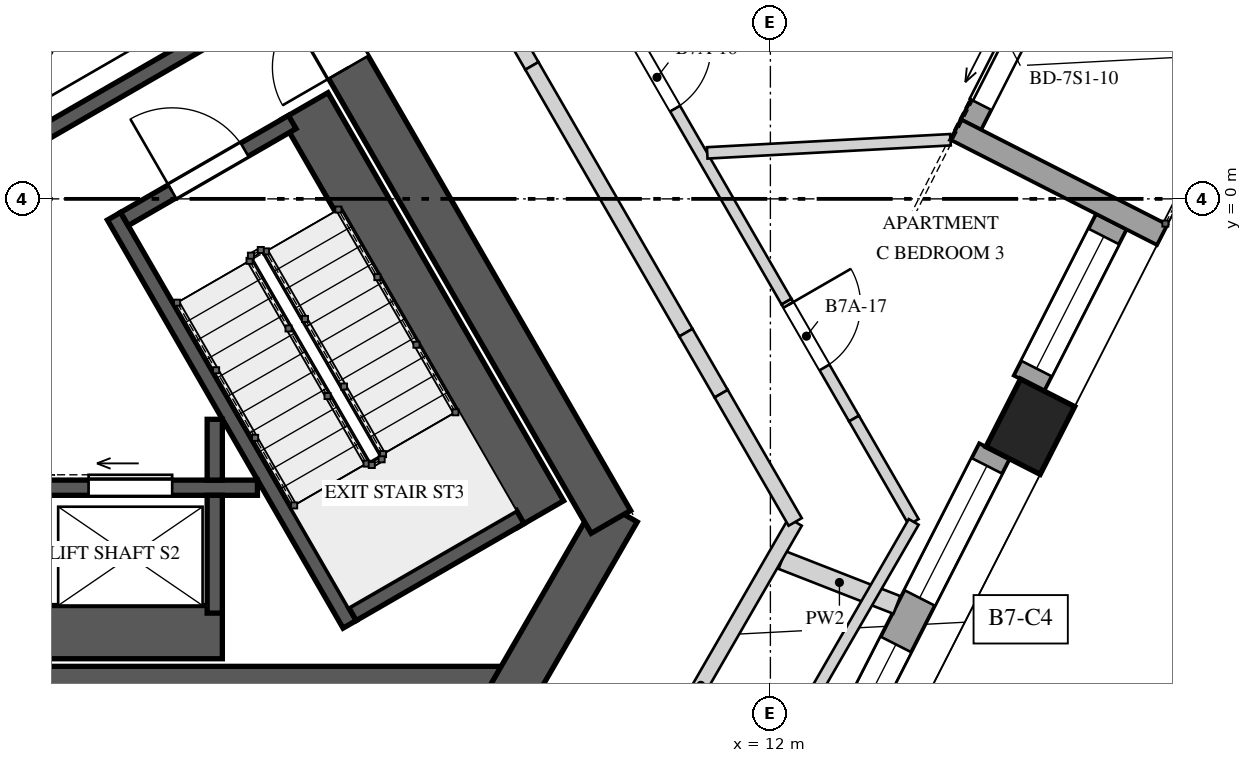
"""IFC4 building model, lengths in metres.
Left out: names, types, materials, properties, quantities, classifications, styles, units other than length and angle.
Written with IfcOpenShell. Run it as: python <this file> out.ifc"""

import sys

from ifc_helpers import new_model, si_unit, direction, frame, frame_2d, origin, origin_2d, place, context, subcontext, project, spatial, polyline, rectangle, outline, extrude, element, fill, save


model = new_model("IFC4")
c1 = context("Model", 3, precision=1e-05, world=origin(), true_north=direction((0.0, 1.0)))
c2 = subcontext(c1, "Body", "Model", "MODEL_VIEW")
j1 = project(units=[si_unit("LENGTHUNIT", "METRE"), si_unit("PLANEANGLEUNIT", "RADIAN")], contexts=[c1])
p1 = place(None, origin())
s1 = spatial("IfcSite", under=j1, at=p1, CompositionType="ELEMENT")
p2 = place(p1, origin())
s2 = spatial("IfcBuilding", under=s1, at=p2, CompositionType="ELEMENT")
p3 = place(p2, frame((0.0, 0.0, 274.4)))
s3 = spatial("IfcBuildingStorey", under=s2, at=p3, CompositionType="ELEMENT", Elevation=274.4)
p4 = place(p3, frame((-8.631, -6.45, 0.0), z_axis=(0.0, 0.0, 1.0), x_axis=(1.0, 0.0, 0.0)))
e1 = element("IfcWall", 1, at=p4, inside=s3, PredefinedType="SHEAR", context=c2, shape_type="SweptSolid", body=[
    extrude(rectangle(XDim=17.263, YDim=0.6, at=frame_2d((8.631, 0.0))), origin(), (0.0, 0.0, 1.0), 4.0),
])
p5 = place(p4, frame((6.836, 0.0, 0.0)))
e2 = element("IfcOpeningElement", 2, at=p5, cuts=e1, PredefinedType="OPENING", context=c2, shape_type="SweptSolid", body=[
    extrude(rectangle(XDim=1.0, YDim=2.4, at=frame_2d((0.5, 1.2))), frame((0.0, 0.31, 0.0), z_axis=(0.0, -1.0, 0.0), x_axis=(1.0, 0.0, 0.0)), (0.0, 0.0, 1.0), 0.62),
])
p6 = place(p3, frame((8.545, -6.6, 0.0), z_axis=(0.0, 0.0, 1.0), x_axis=(0.499995765644, 0.866027848477, 0.0)))
e3 = element("IfcWall", 3, at=p6, inside=s3, PredefinedType="SHEAR", context=c2, shape_type="SweptSolid", body=[
    extrude(rectangle(XDim=2.887, YDim=0.6, at=frame_2d((1.443, 0.0))), origin(), (0.0, 0.0, 1.0), 4.0),
])
p7 = place(p3, frame((9.902, -4.25, 0.0), z_axis=(0.0, 0.0, 1.0), x_axis=(-0.499999536116, 0.866025671608, 0.0)))
e4 = element("IfcWall", 4, at=p7, inside=s3, PredefinedType="SHEAR", context=c2, shape_type="SweptSolid", body=[
    extrude(rectangle(XDim=17.263, YDim=0.6, at=frame_2d((8.631, 0.0))), origin(), (0.0, 0.0, 1.0), 4.0),
])
p8 = place(p7, frame((6.906, 0.0, 0.0)))
e5 = element("IfcOpeningElement", 5, at=p8, cuts=e4, PredefinedType="OPENING", context=c2, shape_type="SweptSolid", body=[
    extrude(rectangle(XDim=1.0, YDim=2.4, at=frame_2d((0.5, 1.2))), frame((0.0, 0.31, 0.0), z_axis=(0.0, -1.0, 0.0), x_axis=(1.0, 0.0, 0.0)), (0.0, 0.0, 1.0), 0.62),
])
p9 = place(p3, frame((15.42, -2.997, -0.35), z_axis=(0.0, 0.0, 1.0), x_axis=(0.45399049974, 0.891006524188, 0.0)))
e6 = element("IfcColumn", 6, at=p9, inside=s3, PredefinedType="COLUMN", context=c2, shape_type="SweptSolid", body=[
    extrude(rectangle(XDim=1.0, YDim=0.8, at=origin_2d()), origin(), (0.0, 0.0, 1.0), 4.35),
])
p10 = place(p3, frame((11.47, -10.143, 0.0), z_axis=(0.0, 0.0, 1.0), x_axis=(0.453995484395, 0.891003984362, 0.0)))
e7 = element("IfcWall", 7, at=p10, inside=s3, PredefinedType="SOLIDWALL", context=c2, shape_type="SweptSolid", body=[
    extrude(rectangle(XDim=7.66, YDim=0.45, at=frame_2d((3.83, 0.0))), origin(), (0.0, 0.0, 1.0), 3.3),
])
p11 = place(p10, frame((0.218, 0.0, 0.4)))
e8 = element("IfcOpeningElement", 8, at=p11, cuts=e7, PredefinedType="OPENING", context=c2, shape_type="SweptSolid", body=[
    extrude(rectangle(XDim=1.95, YDim=2.75, at=frame_2d((0.975, 1.375))), frame((0.0, 0.235, 0.0), z_axis=(0.0, -1.0, 0.0), x_axis=(1.0, 0.0, 0.0)), (0.0, 0.0, 1.0), 0.47),
])
p12 = place(p10, frame((2.855, 0.0, 0.4)))
e9 = element("IfcOpeningElement", 9, at=p12, cuts=e7, PredefinedType="OPENING", context=c2, shape_type="SweptSolid", body=[
    extrude(rectangle(XDim=1.95, YDim=2.75, at=frame_2d((0.975, 1.375))), frame((0.0, 0.235, 0.0), z_axis=(0.0, -1.0, 0.0), x_axis=(1.0, 0.0, 0.0)), (0.0, 0.0, 1.0), 0.47),
])
p13 = place(p10, frame((5.492, 0.0, 0.4)))
e10 = element("IfcOpeningElement", 10, at=p13, cuts=e7, PredefinedType="OPENING", context=c2, shape_type="SweptSolid", body=[
    extrude(rectangle(XDim=1.95, YDim=2.75, at=frame_2d((0.975, 1.375))), frame((0.0, 0.235, 0.0), z_axis=(0.0, -1.0, 0.0), x_axis=(1.0, 0.0, 0.0)), (0.0, 0.0, 1.0), 0.47),
])
p14 = place(p3, frame((15.402, -2.427, 0.0), z_axis=(0.0, 0.0, 1.0), x_axis=(0.453951830128, 0.891026226283, 0.0)))
e11 = element("IfcWall", 11, at=p14, inside=s3, PredefinedType="SOLIDWALL", context=c2, shape_type="SweptSolid", body=[
    extrude(rectangle(XDim=2.387, YDim=0.45, at=frame_2d((1.193, 0.0))), origin(), (0.0, 0.0, 1.0), 3.3),
])
p15 = place(p14, frame((0.218, 0.0, 0.4)))
e12 = element("IfcOpeningElement", 12, at=p15, cuts=e11, PredefinedType="OPENING", context=c2, shape_type="SweptSolid", body=[
    extrude(rectangle(XDim=1.95, YDim=2.75, at=frame_2d((0.975, 1.375))), frame((0.0, 0.235, 0.0), z_axis=(0.0, -1.0, 0.0), x_axis=(1.0, 0.0, 0.0)), (0.0, 0.0, 1.0), 0.47),
])
p16 = place(p3, frame((14.639, 0.977, 0.0), z_axis=(0.0, 0.0, 1.0), x_axis=(0.45403292632, 0.890984905494, 0.0)))
e13 = element("IfcWall", 13, at=p16, inside=s3, PredefinedType="SOLIDWALL", context=c2, shape_type="SweptSolid", body=[
    extrude(rectangle(XDim=2.287, YDim=0.3, at=frame_2d((1.144, 0.0))), origin(), (0.0, 0.0, 1.0), 3.3),
])
p17 = place(p16, frame((0.293, 0.0, 0.0)))
e14 = element("IfcOpeningElement", 14, at=p17, cuts=e13, PredefinedType="OPENING", context=c2, shape_type="SweptSolid", body=[
    extrude(rectangle(XDim=1.7, YDim=2.5, at=frame_2d((0.85, 1.25))), frame((0.0, 0.16, 0.0), z_axis=(0.0, -1.0, 0.0), x_axis=(1.0, 0.0, 0.0)), (0.0, 0.0, 1.0), 0.32),
])
for number, where, z_axis, x_axis in (
    (15, (17.155, -0.473, 0.0), (0.0, 0.0, 1.0), (-0.891, 0.454, 0.0)),
    (16, (18.329, 1.832, 0.0), (0.0, 0.0, 1.0), (-0.891, 0.454, 0.0)),
):
    element("IfcWall", number, at=place(p3, frame(where, z_axis=z_axis, x_axis=x_axis)), inside=s3, PredefinedType="SOLIDWALL", context=c2, shape_type="SweptSolid", body=[
        extrude(rectangle(XDim=3.05, YDim=0.3, at=frame_2d((1.525, 0.0))), origin(), (0.0, 0.0, 1.0), 3.3),
    ])
p18 = place(p3, frame((8.976, -4.147, 0.0), z_axis=(0.0, 0.0, 1.0), x_axis=(-0.49998037582, 0.866036733513, 0.0)))
e17 = element("IfcWall", 17, at=p18, inside=s3, PredefinedType="SOLIDWALL", context=c2, shape_type="SweptSolid", body=[
    extrude(rectangle(XDim=6.2, YDim=0.7, at=frame_2d((3.1, 0.0))), origin(), (0.0, 0.0, 1.0), 3.65),
])
p19 = place(p3, frame((6.465, -5.597, 0.0), z_axis=(0.0, 0.0, 1.0), x_axis=(-0.49998037582, 0.866036733513, 0.0)))
e18 = element("IfcWall", 18, at=p19, inside=s3, PredefinedType="SOLIDWALL", context=c2, shape_type="SweptSolid", body=[
    extrude(rectangle(XDim=6.2, YDim=0.2, at=frame_2d((3.1, 0.0))), origin(), (0.0, 0.0, 1.0), 3.65),
])
p20 = place(p3, frame((6.501, -5.461, 0.0), z_axis=(0.0, 0.0, 1.0), x_axis=(0.865989465428, 0.500062241894, 0.0)))
e19 = element("IfcWall", 19, at=p20, inside=s3, PredefinedType="SOLIDWALL", context=c2, shape_type="SweptSolid", body=[
    extrude(rectangle(XDim=2.55, YDim=0.2, at=frame_2d((1.275, 0.0))), origin(), (0.0, 0.0, 1.0), 3.65),
])
p21 = place(p3, frame((3.501, -0.265, 0.0), z_axis=(0.0, 0.0, 1.0), x_axis=(0.866030925526, 0.499990435942, 0.0)))
e20 = element("IfcWall", 20, at=p21, inside=s3, PredefinedType="SOLIDWALL", context=c2, shape_type="SweptSolid", body=[
    extrude(rectangle(XDim=2.55, YDim=0.2, at=frame_2d((1.275, 0.0))), origin(), (0.0, 0.0, 1.0), 3.65),
])
p22 = place(p21, frame((0.725, 0.0, 0.0)))
e21 = element("IfcOpeningElement", 21, at=p22, cuts=e20, PredefinedType="OPENING", context=c2, shape_type="SweptSolid", body=[
    extrude(rectangle(XDim=1.1, YDim=2.4, at=frame_2d((0.55, 1.2))), frame((0.0, 0.11, 0.0), z_axis=(0.0, -1.0, 0.0), x_axis=(1.0, 0.0, 0.0)), (0.0, 0.0, 1.0), 0.22),
])
p23 = place(p3, frame((-0.71, -3.8, 0.0), z_axis=(0.0, 0.0, 1.0), x_axis=(1.0, 0.0, 0.0)))
e22 = element("IfcWall", 22, at=p23, inside=s3, PredefinedType="SOLIDWALL", context=c2, shape_type="SweptSolid", body=[
    extrude(rectangle(XDim=5.961, YDim=0.2, at=frame_2d((2.981, 0.0))), origin(), (0.0, 0.0, 1.0), 3.65),
])
p24 = place(p23, frame((1.09, 0.0, 0.0)))
e23 = element("IfcOpeningElement", 23, at=p24, cuts=e22, PredefinedType="OPENING", context=c2, shape_type="SweptSolid", body=[
    extrude(rectangle(XDim=1.1, YDim=2.1, at=frame_2d((0.55, 1.05))), frame((0.0, 0.11, 0.0), z_axis=(0.0, -1.0, 0.0), x_axis=(1.0, 0.0, 0.0)), (0.0, 0.0, 1.0), 0.22),
])
p25 = place(p23, frame((3.74, 0.0, 0.0)))
e24 = element("IfcOpeningElement", 24, at=p25, cuts=e22, PredefinedType="OPENING", context=c2, shape_type="SweptSolid", body=[
    extrude(rectangle(XDim=1.1, YDim=2.1, at=frame_2d((0.55, 1.05))), frame((0.0, 0.11, 0.0), z_axis=(0.0, -1.0, 0.0), x_axis=(1.0, 0.0, 0.0)), (0.0, 0.0, 1.0), 0.22),
])
p26 = place(p3, frame((-0.71, -5.7, 0.0), z_axis=(0.0, 0.0, 1.0), x_axis=(1.0, 0.0, 0.0)))
e25 = element("IfcWall", 25, at=p26, inside=s3, PredefinedType="SOLIDWALL", context=c2, shape_type="SweptSolid", body=[
    extrude(rectangle(XDim=5.5, YDim=0.7, at=frame_2d((2.75, 0.0))), origin(), (0.0, 0.0, 1.0), 3.65),
])
p27 = place(p3, frame((4.69, -3.9, 0.0), z_axis=(0.0, 0.0, 1.0), x_axis=(0.0, -1.0, 0.0)))
e26 = element("IfcWall", 26, at=p27, inside=s3, PredefinedType="SOLIDWALL", context=c2, shape_type="SweptSolid", body=[
    extrude(rectangle(XDim=1.55, YDim=0.2, at=frame_2d((0.775, 0.0))), origin(), (0.0, 0.0, 1.0), 3.65),
])
p28 = place(p3, frame((4.69, -2.9, 0.0), z_axis=(0.0, 0.0, 1.0), x_axis=(0.0, -1.0, 0.0)))
e27 = element("IfcWall", 27, at=p28, inside=s3, PredefinedType="SOLIDWALL", context=c2, shape_type="SweptSolid", body=[
    extrude(rectangle(XDim=0.8, YDim=0.2, at=frame_2d((0.4, 0.0))), origin(), (0.0, 0.0, 1.0), 3.65),
])
p29 = place(p3, frame((2.227, 0.743, 0.0), z_axis=(0.0, 0.0, 1.0), x_axis=(0.866035871367, 0.499981869177, 0.0)))
e28 = element("IfcWall", 28, at=p29, inside=s3, PredefinedType="SOLIDWALL", context=c2, shape_type="SweptSolid", body=[
    extrude(rectangle(XDim=3.15, YDim=0.2, at=frame_2d((1.575, 0.0))), origin(), (0.0, 0.0, 1.0), 3.65),
])
p30 = place(p3, frame((10.222, 2.094, 0.0), z_axis=(0.0, 0.0, 1.0), x_axis=(0.500039377857, -0.866002667774, 0.0)))
e29 = element("IfcWall", 29, at=p30, inside=s3, PredefinedType="PARTITIONING", context=c2, shape_type="SweptSolid", body=[
    extrude(rectangle(XDim=3.979, YDim=0.15, at=frame_2d((1.989, 0.0))), origin(), (0.0, 0.0, 1.0), 3.65),
])
p31 = place(p30, frame((0.097, 0.0, 0.0)))
e30 = element("IfcOpeningElement", 30, at=p31, cuts=e29, PredefinedType="OPENING", context=c2, shape_type="SweptSolid", body=[
    extrude(rectangle(XDim=0.95, YDim=2.4, at=frame_2d((0.475, 1.2))), frame((0.0, 0.085, 0.0), z_axis=(0.0, -1.0, 0.0), x_axis=(1.0, 0.0, 0.0)), (0.0, 0.0, 1.0), 0.17),
])
p32 = place(p3, frame((12.212, -1.352, 0.0), z_axis=(0.0, 0.0, 1.0), x_axis=(0.500011952599, -0.866018502838, 0.0)))
e31 = element("IfcWall", 31, at=p32, inside=s3, PredefinedType="PARTITIONING", context=c2, shape_type="SweptSolid", body=[
    extrude(outline(polyline([(0.0, 0.0), (1.776, 0.0), (1.776, 2.95), (0.882, 2.95), (0.882, 3.65), (0.0, 3.65), (0.0, 0.0)])), frame((0.0, 0.075, 0.0), z_axis=(0.0, -1.0, 0.0), x_axis=(1.0, 0.0, 0.0)), (0.0, 0.0, 1.0), 0.15),
])
p33 = place(p32, frame((0.05, 0.0, 0.0)))
e32 = element("IfcOpeningElement", 32, at=p33, cuts=e31, PredefinedType="OPENING", context=c2, shape_type="SweptSolid", body=[
    extrude(rectangle(XDim=0.95, YDim=2.4, at=frame_2d((0.475, 1.2))), frame((0.0, 0.085, 0.0), z_axis=(0.0, -1.0, 0.0), x_axis=(1.0, 0.0, 0.0)), (0.0, 0.0, 1.0), 0.17),
])
p34 = place(p3, frame((13.1, -2.89, 0.0), z_axis=(0.0, 0.0, 1.0), x_axis=(0.499951222523, -0.866053563643, 0.0)))
e33 = element("IfcWall", 33, at=p34, inside=s3, PredefinedType="PARTITIONING", context=c2, shape_type="SweptSolid", body=[
    extrude(rectangle(XDim=1.571, YDim=0.15, at=frame_2d((0.785, 0.0))), origin(), (0.0, 0.0, 1.0), 3.65),
])
p35 = place(p3, frame((12.153, -4.751, 0.0), z_axis=(0.0, 0.0, 1.0), x_axis=(0.931322658747, -0.364195147283, 0.0)))
e34 = element("IfcWall", 34, at=p35, inside=s3, PredefinedType="SOLIDWALL", context=c2, shape_type="SweptSolid", body=[
    extrude(rectangle(XDim=1.623, YDim=0.25, at=frame_2d((0.812, 0.0))), origin(), (0.0, 0.0, 1.0), 3.65),
])
p36 = place(p3, frame((13.885, -4.25, 0.0), z_axis=(0.0, 0.0, 1.0), x_axis=(-0.500003887042, -0.866023159588, 0.0)))
e35 = element("IfcWall", 35, at=p36, inside=s3, PredefinedType="PARTITIONING", context=c2, shape_type="SweptSolid", body=[
    extrude(rectangle(XDim=6.183, YDim=0.15, at=frame_2d((3.091, 0.0))), origin(), (0.0, 0.0, 1.0), 3.65),
])
p37 = place(p36, frame((3.322, 0.0, 0.0)))
e36 = element("IfcOpeningElement", 36, at=p37, cuts=e35, PredefinedType="OPENING", context=c2, shape_type="SweptSolid", body=[
    extrude(rectangle(XDim=0.95, YDim=2.4, at=frame_2d((0.475, 1.2))), frame((0.0, 0.085, 0.0), z_axis=(0.0, -1.0, 0.0), x_axis=(1.0, 0.0, 0.0)), (0.0, 0.0, 1.0), 0.17),
])
p38 = place(p3, frame((14.369, 0.778, 0.0), z_axis=(0.0, 0.0, 1.0), x_axis=(-0.99853649782, -0.054081998127, 0.0)))
e37 = element("IfcWall", 37, at=p38, inside=s3, PredefinedType="PARTITIONING", context=c2, shape_type="SweptSolid", body=[
    extrude(rectangle(XDim=3.205, YDim=0.15, at=frame_2d((1.603, 0.0))), origin(), (0.0, 0.0, 1.0), 3.65),
])
p39 = place(p3, frame((12.326, -4.25, 0.0), z_axis=(0.0, 0.0, 1.0), x_axis=(-0.50000478328, -0.866022642139, 0.0)))
e38 = element("IfcWall", 38, at=p39, inside=s3, PredefinedType="SOLIDWALL", context=c2, shape_type="SweptSolid", body=[
    extrude(rectangle(XDim=4.965, YDim=0.2, at=frame_2d((2.483, 0.0))), origin(), (0.0, 0.0, 1.0), 3.65),
])
p40 = place(p3, frame((8.446, 2.471, 0.0), z_axis=(0.0, 0.0, 1.0), x_axis=(0.499950631041, -0.86605390509, 0.0)))
e39 = element("IfcWall", 39, at=p40, inside=s3, PredefinedType="SOLIDWALL", context=c2, shape_type="SweptSolid", body=[
    extrude(rectangle(XDim=0.833, YDim=0.2, at=frame_2d((0.417, 0.0))), origin(), (0.0, 0.0, 1.0), 2.75),
])
p41 = place(p3, frame((8.863, 1.75, 0.0), z_axis=(0.0, 0.0, 1.0), x_axis=(0.500007556608, -0.866021040931, 0.0)))
e40 = element("IfcWall", 40, at=p41, inside=s3, PredefinedType="SOLIDWALL", context=c2, shape_type="SweptSolid", body=[
    extrude(rectangle(XDim=4.052, YDim=0.2, at=frame_2d((2.026, 0.0))), origin(), (0.0, 0.0, 1.0), 3.65),
])
p42 = place(p3, frame((10.889, -1.76, 0.0), z_axis=(0.0, 0.0, 1.0), x_axis=(0.500102178127, -0.865966403178, 0.0)))
e41 = element("IfcWall", 41, at=p42, inside=s3, PredefinedType="SOLIDWALL", context=c2, shape_type="SweptSolid", body=[
    extrude(rectangle(XDim=0.927, YDim=0.2, at=frame_2d((0.464, 0.0))), origin(), (0.0, 0.0, 1.0), 2.95),
])
p43 = place(p3, frame((11.353, -2.563, 0.0), z_axis=(0.0, 0.0, 1.0), x_axis=(0.499953905513, -0.866052014814, 0.0)))
e42 = element("IfcWall", 42, at=p43, inside=s3, PredefinedType="SOLIDWALL", context=c2, shape_type="SweptSolid", body=[
    extrude(rectangle(XDim=1.948, YDim=0.2, at=frame_2d((0.974, 0.0))), origin(), (0.0, 0.0, 1.0), 3.65),
])
p44 = place(p12, origin())
e43 = element("IfcWindow", 43, at=p44, inside=s3, PartitioningType="SINGLE_PANEL", PredefinedType="WINDOW", context=c2, shape_type="SweptSolid", body=[
    extrude(rectangle(XDim=1.95, YDim=2.75, at=frame_2d((0.975, 1.375))), frame((0.0, 0.03, 0.0), z_axis=(0.0, -1.0, 0.0), x_axis=(1.0, 0.0, 0.0)), (0.0, 0.0, 1.0), 0.06),
])
fill(e9, e43)
p45 = place(p13, origin())
e44 = element("IfcWindow", 44, at=p45, inside=s3, PartitioningType="SINGLE_PANEL", PredefinedType="WINDOW", context=c2, shape_type="SweptSolid", body=[
    extrude(rectangle(XDim=1.95, YDim=2.75, at=frame_2d((0.975, 1.375))), frame((0.0, 0.03, 0.0), z_axis=(0.0, -1.0, 0.0), x_axis=(1.0, 0.0, 0.0)), (0.0, 0.0, 1.0), 0.06),
])
fill(e10, e44)
p46 = place(p15, origin())
e45 = element("IfcWindow", 45, at=p46, inside=s3, PartitioningType="SINGLE_PANEL", PredefinedType="WINDOW", context=c2, shape_type="SweptSolid", body=[
    extrude(rectangle(XDim=1.95, YDim=2.75, at=frame_2d((0.975, 1.375))), frame((0.0, 0.03, 0.0), z_axis=(0.0, -1.0, 0.0), x_axis=(1.0, 0.0, 0.0)), (0.0, 0.0, 1.0), 0.06),
])
fill(e12, e45)
p47 = place(p17, origin())
e46 = element("IfcDoor", 46, at=p47, inside=s3, OperationType="SLIDING_TO_LEFT", PredefinedType="DOOR", context=c2, shape_type="SweptSolid", body=[
    extrude(rectangle(XDim=1.7, YDim=2.5, at=frame_2d((0.85, 1.25))), frame((0.0, 0.025, 0.0), z_axis=(0.0, -1.0, 0.0), x_axis=(1.0, 0.0, 0.0)), (0.0, 0.0, 1.0), 0.05),
])
fill(e14, e46)
p48 = place(p22, origin())
e47 = element("IfcDoor", 47, at=p48, inside=s3, OperationType="SINGLE_SWING_RIGHT", PredefinedType="DOOR", context=c2, shape_type="SweptSolid", body=[
    extrude(rectangle(XDim=1.1, YDim=2.4, at=frame_2d((0.55, 1.2))), frame((0.0, 0.025, 0.0), z_axis=(0.0, -1.0, 0.0), x_axis=(1.0, 0.0, 0.0)), (0.0, 0.0, 1.0), 0.05),
])
fill(e21, e47)
p49 = place(p25, origin())
e48 = element("IfcDoor", 48, at=p49, inside=s3, OperationType="SLIDING_TO_LEFT", PredefinedType="DOOR", context=c2, shape_type="SweptSolid", body=[
    extrude(rectangle(XDim=1.1, YDim=2.1, at=frame_2d((0.55, 1.05))), frame((0.0, 0.025, 0.0), z_axis=(0.0, -1.0, 0.0), x_axis=(1.0, 0.0, 0.0)), (0.0, 0.0, 1.0), 0.05),
])
fill(e24, e48)
p50 = place(p8, origin())
e49 = element("IfcDoor", 49, at=p50, inside=s3, OperationType="SINGLE_SWING_LEFT", PredefinedType="DOOR", context=c2, shape_type="SweptSolid", body=[
    extrude(rectangle(XDim=1.0, YDim=2.4, at=frame_2d((0.5, 1.2))), frame((0.0, 0.025, 0.0), z_axis=(0.0, -1.0, 0.0), x_axis=(1.0, 0.0, 0.0)), (0.0, 0.0, 1.0), 0.05),
])
fill(e5, e49)
p51 = place(p31, origin())
e50 = element("IfcDoor", 50, at=p51, inside=s3, OperationType="SINGLE_SWING_RIGHT", PredefinedType="DOOR", context=c2, shape_type="SweptSolid", body=[
    extrude(rectangle(XDim=0.95, YDim=2.4, at=frame_2d((0.475, 1.2))), frame((0.0, 0.025, 0.0), z_axis=(0.0, -1.0, 0.0), x_axis=(1.0, 0.0, 0.0)), (0.0, 0.0, 1.0), 0.05),
])
fill(e30, e50)
p52 = place(p33, origin())
e51 = element("IfcDoor", 51, at=p52, inside=s3, OperationType="SINGLE_SWING_LEFT", PredefinedType="DOOR", context=c2, shape_type="SweptSolid", body=[
    extrude(rectangle(XDim=0.95, YDim=2.4, at=frame_2d((0.475, 1.2))), frame((0.0, 0.025, 0.0), z_axis=(0.0, -1.0, 0.0), x_axis=(1.0, 0.0, 0.0)), (0.0, 0.0, 1.0), 0.05),
])
fill(e32, e51)
save(model, sys.argv[1])
